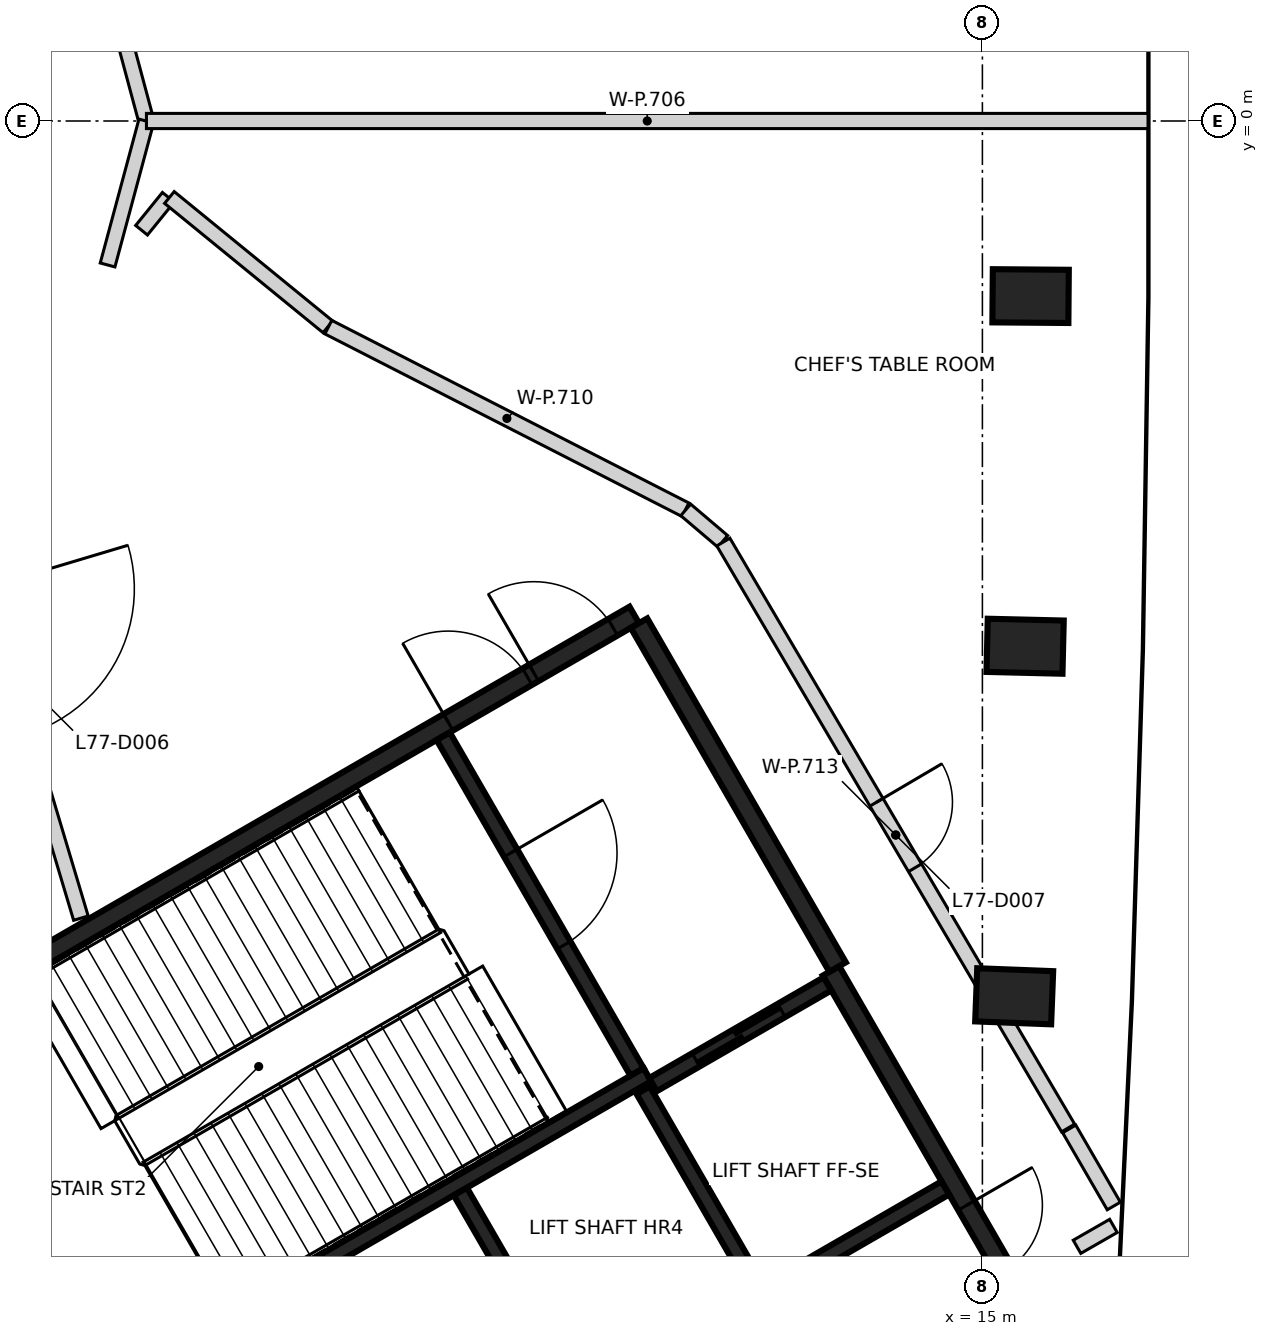
"""IFC4 building model, lengths in metres.
Left out: names, types, materials, properties, quantities, classifications, styles, units other than length and angle.
Written with IfcOpenShell. Run it as: python <this file> out.ifc"""

import sys

from ifc_helpers import new_model, si_unit, direction, frame, frame_2d, origin, origin_2d, place, context, subcontext, project, spatial, rectangle, extrude, element, fill, save


model = new_model("IFC4")
c1 = context("Model", 3, precision=1e-05, world=origin(), true_north=direction((0.0, 1.0)))
c2 = subcontext(c1, "Body", "Model", "MODEL_VIEW")
j1 = project(units=[si_unit("LENGTHUNIT", "METRE"), si_unit("PLANEANGLEUNIT", "RADIAN")], contexts=[c1])
p1 = place(None, origin())
s1 = spatial("IfcSite", under=j1, at=p1, CompositionType="ELEMENT")
p2 = place(p1, origin())
s2 = spatial("IfcBuilding", under=s1, at=p2, CompositionType="ELEMENT")
p3 = place(p2, frame((0.0, 0.0, 306.6)))
s3 = spatial("IfcBuildingStorey", under=s2, at=p3, CompositionType="ELEMENT", Elevation=306.6)
for number, where, z_axis, x_axis in (
    (1, (15.418, -11.515, -0.35), (0.0, 0.0, 1.0), (-0.999, 0.039, 0.0)),
    (2, (15.562, -6.91, -0.35), (0.0, 0.0, 1.0), (-1.0, 0.024, 0.0)),
    (3, (15.634, -2.303, -0.35), (0.0, 0.0, 1.0), (-1.0, 0.008, 0.0)),
):
    element("IfcColumn", number, at=place(p3, frame(where, z_axis=z_axis, x_axis=x_axis)), inside=s3, PredefinedType="COLUMN", context=c2, shape_type="SweptSolid", body=[
        extrude(rectangle(XDim=1.0, YDim=0.7, at=origin_2d()), origin(), (0.0, 0.0, 1.0), 6.0),
    ])
p4 = place(p3, frame((0.417, -12.273, 0.0), z_axis=(0.0, 0.0, 1.0), x_axis=(0.866021906294, 0.500006057782, 0.0)))
e4 = element("IfcWall", 4, at=p4, inside=s3, PredefinedType="SHEAR", context=c2, shape_type="SweptSolid", body=[
    extrude(rectangle(XDim=11.55, YDim=0.25, at=frame_2d((5.775, 0.0))), origin(), (0.0, 0.0, 1.0), 5.65),
])
p5 = place(p4, frame((10.025, 0.0, 0.0)))
e5 = element("IfcOpeningElement", 5, at=p5, cuts=e4, PredefinedType="OPENING", context=c2, shape_type="SweptSolid", body=[
    extrude(rectangle(XDim=1.2, YDim=2.1, at=frame_2d((0.6, 1.05))), frame((0.0, 0.135, 0.0), z_axis=(0.0, -1.0, 0.0), x_axis=(1.0, 0.0, 0.0)), (0.0, 0.0, 1.0), 0.27),
])
p6 = place(p4, frame((8.725, 0.0, 0.0)))
e6 = element("IfcOpeningElement", 6, at=p6, cuts=e4, PredefinedType="OPENING", context=c2, shape_type="SweptSolid", body=[
    extrude(rectangle(XDim=1.2, YDim=2.1, at=frame_2d((0.6, 1.05))), frame((0.0, 0.135, 0.0), z_axis=(0.0, -1.0, 0.0), x_axis=(1.0, 0.0, 0.0)), (0.0, 0.0, 1.0), 0.27),
])
p7 = place(p3, frame((13.008, -11.181, 0.0), z_axis=(0.0, 0.0, 1.0), x_axis=(0.500001955336, -0.866024274868, 0.0)))
e7 = element("IfcWall", 7, at=p7, inside=s3, PredefinedType="SHEAR", context=c2, shape_type="SweptSolid", body=[
    extrude(rectangle(XDim=6.125, YDim=0.25, at=frame_2d((3.062, 0.0))), origin(), (0.0, 0.0, 1.0), 5.65),
])
p8 = place(p7, frame((3.563, 0.0, 0.0)))
e8 = element("IfcOpeningElement", 8, at=p8, cuts=e7, PredefinedType="OPENING", context=c2, shape_type="SweptSolid", body=[
    extrude(rectangle(XDim=1.0, YDim=2.1, at=frame_2d((0.5, 1.05))), frame((0.0, 0.135, 0.0), z_axis=(0.0, -1.0, 0.0), x_axis=(1.0, 0.0, 0.0)), (0.0, 0.0, 1.0), 0.27),
])
p9 = place(p3, frame((3.235, -17.153, 0.0), z_axis=(0.0, 0.0, 1.0), x_axis=(-0.500008851346, 0.866020293397, 0.0)))
e9 = element("IfcWall", 9, at=p9, inside=s3, PredefinedType="SHEAR", context=c2, shape_type="SweptSolid", body=[
    extrude(rectangle(XDim=5.51, YDim=0.25, at=frame_2d((2.755, 0.0))), origin(), (0.0, 0.0, 1.0), 5.65),
])
p10 = place(p3, frame((10.483, -6.606, 0.0), z_axis=(0.0, 0.0, 1.0), x_axis=(0.49999885962, -0.866026062182, 0.0)))
e10 = element("IfcWall", 10, at=p10, inside=s3, PredefinedType="SHEAR", context=c2, shape_type="SweptSolid", body=[
    extrude(rectangle(XDim=5.225, YDim=0.25, at=frame_2d((2.612, 0.0))), origin(), (0.0, 0.0, 1.0), 5.65),
])
p11 = place(p3, frame((5.419, -15.534, 0.0), z_axis=(0.0, 0.0, 1.0), x_axis=(0.866029065029, 0.499993658486, 0.0)))
e11 = element("IfcWall", 11, at=p11, inside=s3, PredefinedType="SHEAR", context=c2, shape_type="SweptSolid", body=[
    extrude(rectangle(XDim=5.974, YDim=0.2, at=frame_2d((2.987, 0.0))), origin(), (0.0, 0.0, 1.0), 5.65),
])
p12 = place(p3, frame((7.906, -8.094, 0.0), z_axis=(0.0, 0.0, 1.0), x_axis=(0.500027839223, -0.866009330205, 0.0)))
e12 = element("IfcWall", 12, at=p12, inside=s3, PredefinedType="SHEAR", context=c2, shape_type="SweptSolid", body=[
    extrude(rectangle(XDim=5.098, YDim=0.2, at=frame_2d((2.549, 0.0))), origin(), (0.0, 0.0, 1.0), 5.65),
])
p13 = place(p12, frame((1.774, 0.0, 0.0)))
e13 = element("IfcOpeningElement", 13, at=p13, cuts=e12, PredefinedType="OPENING", context=c2, shape_type="SweptSolid", body=[
    extrude(rectangle(XDim=1.4, YDim=2.1, at=frame_2d((0.7, 1.05))), frame((0.0, 0.11, 0.0), z_axis=(0.0, -1.0, 0.0), x_axis=(1.0, 0.0, 0.0)), (0.0, 0.0, 1.0), 0.22),
])
p14 = place(p3, frame((8.132, -14.084, 0.0), z_axis=(0.0, 0.0, 1.0), x_axis=(0.499997778408, -0.866026686418, 0.0)))
e14 = element("IfcWall", 14, at=p14, inside=s3, PredefinedType="SHEAR", context=c2, shape_type="SweptSolid", body=[
    extrude(rectangle(XDim=3.198, YDim=0.2, at=frame_2d((1.599, 0.0))), origin(), (0.0, 0.0, 1.0), 5.65),
])
p15 = place(p3, frame((12.088, -15.437, 0.0), z_axis=(0.0, 0.0, 1.0), x_axis=(-0.500026960575, 0.86600983753, 0.0)))
e15 = element("IfcWall", 15, at=p15, inside=s3, PredefinedType="SHEAR", context=c2, shape_type="SweptSolid", body=[
    extrude(rectangle(XDim=3.1, YDim=0.2, at=frame_2d((1.55, 0.0))), origin(), (0.0, 0.0, 1.0), 5.65),
])
p16 = place(p3, frame((10.666, -12.678, 0.0), z_axis=(0.0, 0.0, 1.0), x_axis=(0.866018407898, 0.500012117035, 0.0)))
e16 = element("IfcWall", 16, at=p16, inside=s3, PredefinedType="SHEAR", context=c2, shape_type="SweptSolid", body=[
    extrude(rectangle(XDim=2.651, YDim=0.2, at=frame_2d((1.325, 0.0))), origin(), (0.0, 0.0, 1.0), 5.65),
])
p17 = place(p16, frame((0.652, 0.0, 0.0)))
e17 = element("IfcOpeningElement", 17, at=p17, cuts=e16, PredefinedType="OPENING", context=c2, shape_type="SweptSolid", body=[
    extrude(rectangle(XDim=1.3, YDim=2.1, at=frame_2d((0.65, 1.05))), frame((0.0, 0.11, 0.0), z_axis=(0.0, -1.0, 0.0), x_axis=(1.0, 0.0, 0.0)), (0.0, 0.0, 1.0), 0.22),
])
p18 = place(p3, frame((14.512, -14.037, 0.0), z_axis=(0.0, 0.0, 1.0), x_axis=(-0.866018407898, -0.500012117035, 0.0)))
e18 = element("IfcWall", 18, at=p18, inside=s3, PredefinedType="SHEAR", context=c2, shape_type="SweptSolid", body=[
    extrude(rectangle(XDim=2.651, YDim=0.2, at=frame_2d((1.325, 0.0))), origin(), (0.0, 0.0, 1.0), 5.65),
])
p19 = place(p3, frame((1.111, -3.708, 0.0), z_axis=(0.0, 0.0, 1.0), x_axis=(0.286702116172, -0.958019778805, 0.0)))
e19 = element("IfcWall", 19, at=p19, inside=s3, PredefinedType="PARTITIONING", context=c2, shape_type="SweptSolid", body=[
    extrude(rectangle(XDim=7.076, YDim=0.2, at=frame_2d((3.538, 0.0))), origin(), (0.0, 0.0, 1.0), 5.65),
])
p20 = place(p19, frame((2.554, 0.0, 0.0)))
e20 = element("IfcOpeningElement", 20, at=p20, cuts=e19, PredefinedType="OPENING", context=c2, shape_type="SweptSolid", body=[
    extrude(rectangle(XDim=2.0, YDim=2.1, at=frame_2d((1.0, 1.05))), frame((0.0, 0.11, 0.0), z_axis=(0.0, -1.0, 0.0), x_axis=(1.0, 0.0, 0.0)), (0.0, 0.0, 1.0), 0.22),
])
p21 = place(p3, frame((3.465, 1.994, 0.0), z_axis=(0.0, 0.0, 1.0), x_axis=(0.259230860242, -0.965815386654, 0.0)))
e21 = element("IfcWall", 21, at=p21, inside=s3, PredefinedType="PARTITIONING", context=c2, shape_type="SweptSolid", body=[
    extrude(rectangle(XDim=2.063, YDim=0.2, at=frame_2d((1.032, 0.0))), origin(), (0.0, 0.0, 1.0), 5.65),
])
p22 = place(p3, frame((3.491, -1.894, 0.0), z_axis=(0.0, 0.0, 1.0), x_axis=(0.259669750265, 0.965697478923, 0.0)))
e22 = element("IfcWall", 22, at=p22, inside=s3, PredefinedType="PARTITIONING", context=c2, shape_type="SweptSolid", body=[
    extrude(rectangle(XDim=1.96, YDim=0.2, at=frame_2d((0.98, 0.0))), origin(), (0.0, 0.0, 1.0), 5.65),
])
p23 = place(p3, frame((3.938, -1.437, 0.0), z_axis=(0.0, 0.0, 1.0), x_axis=(0.629901677938, 0.776674884447, 0.0)))
e23 = element("IfcWall", 23, at=p23, inside=s3, PredefinedType="PARTITIONING", context=c2, shape_type="SweptSolid", body=[
    extrude(rectangle(XDim=0.559, YDim=0.2, at=frame_2d((0.279, 0.0))), origin(), (0.0, 0.0, 1.0), 5.65),
])
p24 = place(p3, frame((4.002, 0.0, 0.0), z_axis=(0.0, 0.0, 1.0), x_axis=(1.0, 0.0, 0.0)))
e24 = element("IfcWall", 24, at=p24, inside=s3, PredefinedType="PARTITIONING", context=c2, shape_type="SweptSolid", body=[
    extrude(rectangle(XDim=13.177, YDim=0.2, at=frame_2d((6.589, 0.0))), origin(), (0.0, 0.0, 1.0), 4.75),
])
p25 = place(p3, frame((4.304, -1.006, 0.0), z_axis=(0.0, 0.0, 1.0), x_axis=(0.774680244544, -0.632353159803, 0.0)))
e25 = element("IfcWall", 25, at=p25, inside=s3, PredefinedType="PARTITIONING", context=c2, shape_type="SweptSolid", body=[
    extrude(rectangle(XDim=2.691, YDim=0.2, at=frame_2d((1.346, 0.0))), origin(), (0.0, 0.0, 1.0), 5.65),
])
p26 = place(p3, frame((6.395, -2.712, 0.0), z_axis=(0.0, 0.0, 1.0), x_axis=(0.890365503059, -0.455246384898, 0.0)))
e26 = element("IfcWall", 26, at=p26, inside=s3, PredefinedType="PARTITIONING", context=c2, shape_type="SweptSolid", body=[
    extrude(rectangle(XDim=5.276, YDim=0.2, at=frame_2d((2.638, 0.0))), origin(), (0.0, 0.0, 1.0), 5.65),
])
p27 = place(p3, frame((11.097, -5.116, 0.0), z_axis=(0.0, 0.0, 1.0), x_axis=(0.761892201705, -0.647703846662, 0.0)))
e27 = element("IfcWall", 27, at=p27, inside=s3, PredefinedType="PARTITIONING", context=c2, shape_type="SweptSolid", body=[
    extrude(rectangle(XDim=0.639, YDim=0.2, at=frame_2d((0.32, 0.0))), origin(), (0.0, 0.0, 1.0), 5.65),
])
p28 = place(p3, frame((11.592, -5.539, 0.0), z_axis=(0.0, 0.0, 1.0), x_axis=(0.507119130029, -0.861875970171, 0.0)))
e28 = element("IfcWall", 28, at=p28, inside=s3, PredefinedType="PARTITIONING", context=c2, shape_type="SweptSolid", body=[
    extrude(rectangle(XDim=8.944, YDim=0.2, at=frame_2d((4.472, 0.0))), origin(), (0.0, 0.0, 1.0), 4.75),
])
p29 = place(p28, frame((3.972, 0.0, 0.0)))
e29 = element("IfcOpeningElement", 29, at=p29, cuts=e28, PredefinedType="OPENING", context=c2, shape_type="SweptSolid", body=[
    extrude(rectangle(XDim=1.0, YDim=2.1, at=frame_2d((0.5, 1.05))), frame((0.0, 0.11, 0.0), z_axis=(0.0, -1.0, 0.0), x_axis=(1.0, 0.0, 0.0)), (0.0, 0.0, 1.0), 0.22),
])
p30 = place(p3, frame((16.142, -13.26, 0.0), z_axis=(0.0, 0.0, 1.0), x_axis=(0.500978766574, -0.865459574701, 0.0)))
e30 = element("IfcWall", 30, at=p30, inside=s3, PredefinedType="PARTITIONING", context=c2, shape_type="SweptSolid", body=[
    extrude(rectangle(XDim=1.172, YDim=0.2, at=frame_2d((0.586, 0.0))), origin(), (0.0, 0.0, 1.0), 5.65),
])
p31 = place(p3, frame((16.245, -14.811, 0.0), z_axis=(0.0, 0.0, 1.0), x_axis=(0.867125849654, 0.498089109358, 0.0)))
e31 = element("IfcWall", 31, at=p31, inside=s3, PredefinedType="PARTITIONING", context=c2, shape_type="SweptSolid", body=[
    extrude(rectangle(XDim=0.552, YDim=0.2, at=frame_2d((0.276, 0.0))), origin(), (0.0, 0.0, 1.0), 5.65),
])
p32 = place(p17, origin())
e32 = element("IfcDoor", 32, at=p32, inside=s3, OperationType="SLIDING_TO_RIGHT", PredefinedType="DOOR", context=c2, shape_type="SweptSolid", body=[
    extrude(rectangle(XDim=1.3, YDim=2.1, at=frame_2d((0.65, 1.05))), frame((0.0, 0.025, 0.0), z_axis=(0.0, -1.0, 0.0), x_axis=(1.0, 0.0, 0.0)), (0.0, 0.0, 1.0), 0.05),
])
fill(e17, e32)
p33 = place(p8, origin())
e33 = element("IfcDoor", 33, at=p33, inside=s3, OperationType="SINGLE_SWING_LEFT", PredefinedType="DOOR", context=c2, shape_type="SweptSolid", body=[
    extrude(rectangle(XDim=1.0, YDim=2.1, at=frame_2d((0.5, 1.05))), frame((0.0, 0.025, 0.0), z_axis=(0.0, -1.0, 0.0), x_axis=(1.0, 0.0, 0.0)), (0.0, 0.0, 1.0), 0.05),
])
fill(e8, e33)
p34 = place(p5, origin())
e34 = element("IfcDoor", 34, at=p34, inside=s3, OperationType="SINGLE_SWING_LEFT", PredefinedType="DOOR", context=c2, shape_type="SweptSolid", body=[
    extrude(rectangle(XDim=1.2, YDim=2.1, at=frame_2d((0.6, 1.05))), frame((0.0, 0.025, 0.0), z_axis=(0.0, -1.0, 0.0), x_axis=(1.0, 0.0, 0.0)), (0.0, 0.0, 1.0), 0.05),
])
fill(e5, e34)
p35 = place(p6, origin())
e35 = element("IfcDoor", 35, at=p35, inside=s3, OperationType="SINGLE_SWING_RIGHT", PredefinedType="DOOR", context=c2, shape_type="SweptSolid", body=[
    extrude(rectangle(XDim=1.2, YDim=2.1, at=frame_2d((0.6, 1.05))), frame((0.0, 0.025, 0.0), z_axis=(0.0, -1.0, 0.0), x_axis=(1.0, 0.0, 0.0)), (0.0, 0.0, 1.0), 0.05),
])
fill(e6, e35)
p36 = place(p13, origin())
e36 = element("IfcDoor", 36, at=p36, inside=s3, OperationType="SINGLE_SWING_RIGHT", PredefinedType="DOOR", context=c2, shape_type="SweptSolid", body=[
    extrude(rectangle(XDim=1.4, YDim=2.1, at=frame_2d((0.7, 1.05))), frame((0.0, 0.025, 0.0), z_axis=(0.0, -1.0, 0.0), x_axis=(1.0, 0.0, 0.0)), (0.0, 0.0, 1.0), 0.05),
])
fill(e13, e36)
p37 = place(p29, origin())
e37 = element("IfcDoor", 37, at=p37, inside=s3, OperationType="SINGLE_SWING_LEFT", PredefinedType="DOOR", context=c2, shape_type="SweptSolid", body=[
    extrude(rectangle(XDim=1.0, YDim=2.1, at=frame_2d((0.5, 1.05))), frame((0.0, 0.025, 0.0), z_axis=(0.0, -1.0, 0.0), x_axis=(1.0, 0.0, 0.0)), (0.0, 0.0, 1.0), 0.05),
])
fill(e29, e37)
save(model, sys.argv[1])
